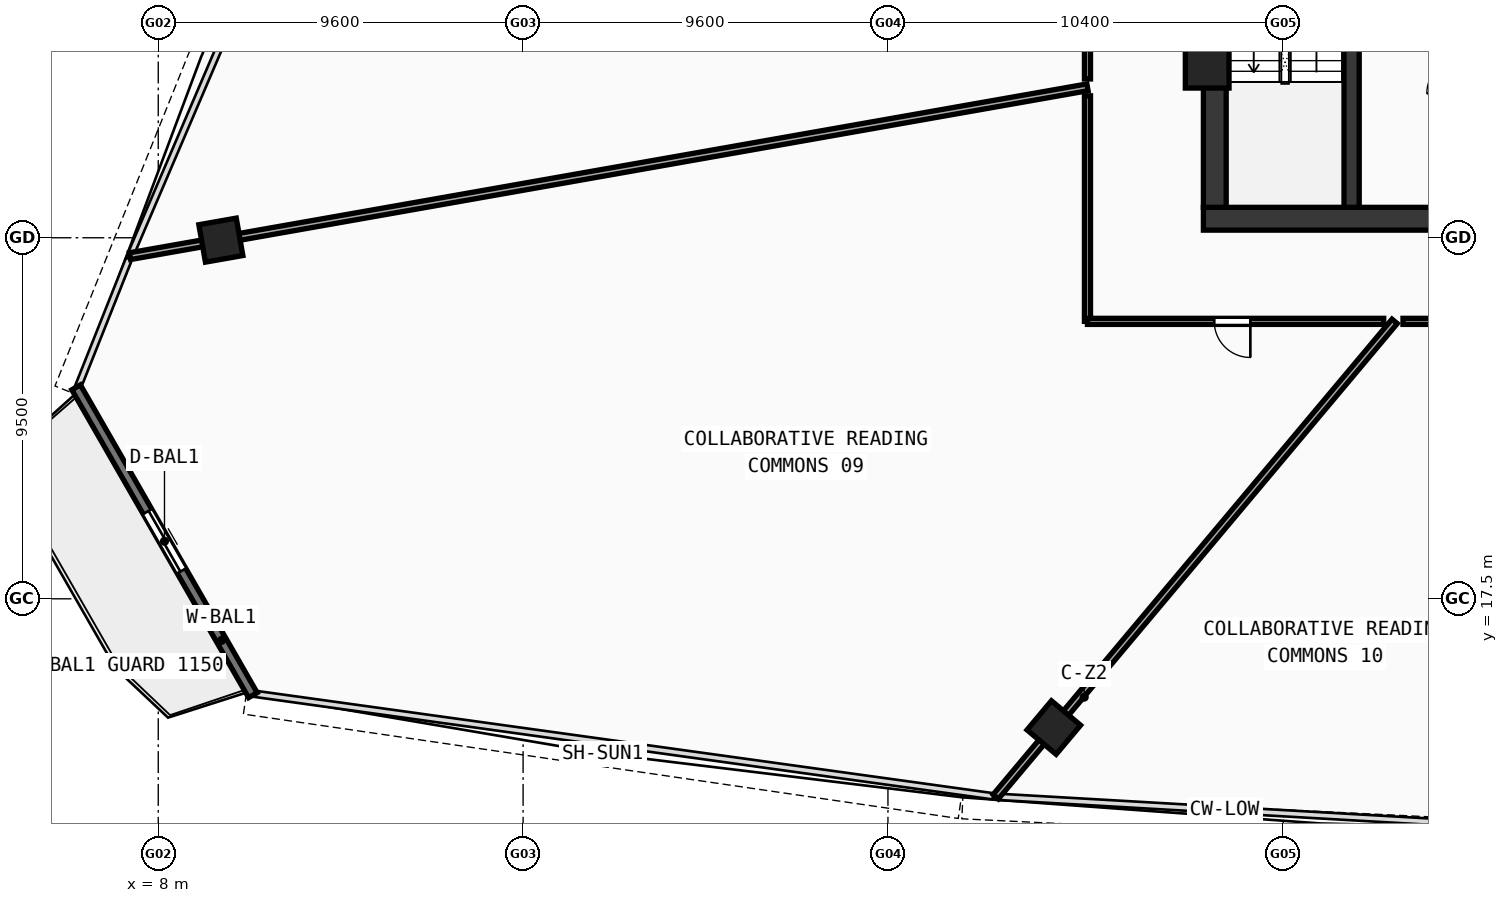
"""IFC4 building model, lengths in metres.
Left out: names, types, materials, properties, quantities, classifications, styles, units other than length and angle.
Written with IfcOpenShell. Run it as: python <this file> out.ifc"""

import sys

from ifc_helpers import new_model, si_unit, direction, frame, frame_2d, origin, origin_with_axes, origin_2d, place, context, subcontext, project, spatial, rectangle, hollow_rectangle, extrude, source, transform, mapped, element, fill, save


model = new_model("IFC4")
c1 = context("Model", 3, precision=1e-05, world=origin(), true_north=direction((0.0, 1.0)))
c2 = subcontext(c1, "Body", "Model", "MODEL_VIEW")
j1 = project(units=[si_unit("LENGTHUNIT", "METRE"), si_unit("PLANEANGLEUNIT", "RADIAN")], contexts=[c1])
p1 = place(None, origin())
s1 = spatial("IfcSite", under=j1, at=p1, CompositionType="ELEMENT")
p2 = place(p1, origin())
s2 = spatial("IfcBuilding", under=s1, at=p2, CompositionType="ELEMENT")
p3 = place(p2, frame((0.0, 0.0, 84.98)))
s3 = spatial("IfcBuildingStorey", under=s2, at=p3, CompositionType="ELEMENT", Elevation=84.98)
p4 = place(p3, frame((35.5, 27.5, 0.0), z_axis=(0.0, 0.0, 1.0), x_axis=(1.0, 0.0, 0.0)))
e1 = element("IfcWall", 1, at=p4, inside=s3, PredefinedType="SHEAR", context=c2, shape_type="SweptSolid", body=[
    extrude(rectangle(XDim=25.0, YDim=0.6, at=frame_2d((12.5, 0.0))), origin(), (0.0, 0.0, 1.0), 3.54),
])
p5 = place(p3, frame((35.8, 27.8, 0.0), z_axis=(0.0, 0.0, 1.0), x_axis=(0.0, 1.0, 0.0)))
e2 = element("IfcWall", 2, at=p5, inside=s3, PredefinedType="SHEAR", context=c2, shape_type="SweptSolid", body=[
    extrude(rectangle(XDim=12.1, YDim=0.6, at=frame_2d((6.05, 0.0))), origin(), (0.0, 0.0, 1.0), 3.54),
])
p6 = place(p3, frame((39.4, 27.8, 0.0), z_axis=(0.0, 0.0, 1.0), x_axis=(0.0, 1.0, 0.0)))
e3 = element("IfcWall", 3, at=p6, inside=s3, PredefinedType="SHEAR", context=c2, shape_type="SweptSolid", body=[
    extrude(rectangle(XDim=12.1, YDim=0.4, at=frame_2d((6.05, 0.0))), origin(), (0.0, 0.0, 1.0), 3.54),
])
p7 = place(p6, frame((9.95, 0.0, 0.0)))
e4 = element("IfcOpeningElement", 4, at=p7, cuts=e3, PredefinedType="OPENING", context=c2, shape_type="SweptSolid", body=[
    extrude(rectangle(XDim=1.1, YDim=2.1, at=frame_2d((0.55, 1.05))), frame((0.0, 0.21, 0.0), z_axis=(0.0, -1.0, 0.0), x_axis=(1.0, 0.0, 0.0)), (0.0, 0.0, 1.0), 0.42),
])
m1 = source(origin(), c2, "Body", "SweptSolid", [
    extrude(hollow_rectangle(XDim=1.15, YDim=1.15, WallThickness=0.048, at=origin_2d()), origin(), (0.0, 0.0, 1.0), 3.8),
])
p8 = place(p3, frame((35.6, 31.513, -0.26), z_axis=(0.0, 0.0, 1.0), x_axis=(1.0, 0.0, 0.0)))
e5 = element("IfcColumn", 5, at=p8, inside=s3, PredefinedType="COLUMN", context=c2, shape_type="MappedRepresentation", body=[
    mapped(m1, transform((0.0, 0.0, 0.0), scale=1.0)),
])
m2 = source(origin(), c2, "Body", "SweptSolid", [
    extrude(hollow_rectangle(XDim=1.0, YDim=1.0, WallThickness=0.042, at=origin_2d()), origin(), (0.0, 0.0, 1.0), 3.8),
])
for number, where, z_axis, x_axis in (
    (6, (31.564, 14.112, -0.26), (0.0, 0.0, 1.0), (0.766, -0.643, 0.0)),
    (7, (9.647, 26.938, -0.26), (0.0, 0.0, 1.0), (0.174, -0.985, 0.0)),
):
    element("IfcColumn", number, at=place(p3, frame(where, z_axis=z_axis, x_axis=x_axis)), inside=s3, PredefinedType="COLUMN", context=c2, shape_type="MappedRepresentation", body=[
        mapped(m2, transform((0.0, 0.0, 0.0), scale=1.0)),
    ])
p9 = place(p3, frame((5.838, 23.065, 0.0), z_axis=(0.0, 0.0, 1.0), x_axis=(0.497922114025, -0.867221752705, 0.0)))
e8 = element("IfcWall", 8, at=p9, inside=s3, PredefinedType="STANDARD", context=c2, shape_type="SweptSolid", body=[
    extrude(rectangle(XDim=9.343, YDim=0.26, at=frame_2d((4.671, 0.0))), origin(), (0.0, 0.0, 1.0), 3.54),
])
p10 = place(p9, frame((3.771, 0.0, 0.0)))
e9 = element("IfcOpeningElement", 9, at=p10, cuts=e8, PredefinedType="OPENING", context=c2, shape_type="SweptSolid", body=[
    extrude(rectangle(XDim=1.8, YDim=2.15, at=frame_2d((0.9, 1.075))), frame((0.0, 0.14, 0.0), z_axis=(0.0, -1.0, 0.0), x_axis=(1.0, 0.0, 0.0)), (0.0, 0.0, 1.0), 0.28),
])
p11 = place(p3, frame((32.45, 30.958, 0.0), z_axis=(0.0, 0.0, 1.0), x_axis=(-0.984808048641, -0.173646501066, 0.0)))
e10 = element("IfcWall", 10, at=p11, inside=s3, PredefinedType="PARTITIONING", context=c2, shape_type="SweptSolid", body=[
    extrude(rectangle(XDim=25.582, YDim=0.18, at=frame_2d((12.791, 0.0))), origin(), (0.0, 0.0, 1.0), 2.84),
])
p12 = place(p3, frame((40.532, 24.8, 0.0), z_axis=(0.0, 0.0, 1.0), x_axis=(-0.642790086939, -0.76604236445, 0.0)))
e11 = element("IfcWall", 11, at=p12, inside=s3, PredefinedType="PARTITIONING", context=c2, shape_type="SweptSolid", body=[
    extrude(rectangle(XDim=16.326, YDim=0.18, at=frame_2d((8.163, 0.0))), origin(), (0.0, 0.0, 1.0), 2.84),
])
p13 = place(p3, frame((32.45, 24.8, 0.0), z_axis=(0.0, 0.0, 1.0), x_axis=(0.0, 1.0, 0.0)))
e12 = element("IfcWall", 12, at=p13, inside=s3, PredefinedType="PARTITIONING", context=c2, shape_type="SweptSolid", body=[
    extrude(rectangle(XDim=5.935, YDim=0.16, at=frame_2d((2.967, 0.0))), origin(), (0.0, 0.0, 1.0), 3.14),
])
p14 = place(p3, frame((32.45, 31.178, 0.0), z_axis=(0.0, 0.0, 1.0), x_axis=(0.0, 1.0, 0.0)))
e13 = element("IfcWall", 13, at=p14, inside=s3, PredefinedType="PARTITIONING", context=c2, shape_type="SweptSolid", body=[
    extrude(rectangle(XDim=16.304, YDim=0.16, at=frame_2d((8.152, 0.0))), origin(), (0.0, 0.0, 1.0), 2.84),
])
p15 = place(p14, frame((7.677, 0.0, 0.0)))
e14 = element("IfcOpeningElement", 14, at=p15, cuts=e13, PredefinedType="OPENING", context=c2, shape_type="SweptSolid", body=[
    extrude(rectangle(XDim=0.95, YDim=2.1, at=frame_2d((0.475, 1.05))), frame((0.0, 0.09, 0.0), z_axis=(0.0, -1.0, 0.0), x_axis=(1.0, 0.0, 0.0)), (0.0, 0.0, 1.0), 0.18),
])
p16 = place(p3, frame((45.387, 24.8, 0.0), z_axis=(0.0, 0.0, 1.0), x_axis=(-1.0, 0.0, 0.0)))
e15 = element("IfcWall", 15, at=p16, inside=s3, PredefinedType="PARTITIONING", context=c2, shape_type="SweptSolid", body=[
    extrude(rectangle(XDim=4.635, YDim=0.16, at=frame_2d((2.318, 0.0))), origin(), (0.0, 0.0, 1.0), 2.84),
])
p17 = place(p16, frame((1.839, 0.0, 0.0)))
e16 = element("IfcOpeningElement", 16, at=p17, cuts=e15, PredefinedType="OPENING", context=c2, shape_type="SweptSolid", body=[
    extrude(rectangle(XDim=0.95, YDim=2.1, at=frame_2d((0.475, 1.05))), frame((0.0, 0.09, 0.0), z_axis=(0.0, -1.0, 0.0), x_axis=(1.0, 0.0, 0.0)), (0.0, 0.0, 1.0), 0.18),
])
p18 = place(p3, frame((40.245, 24.8, 0.0), z_axis=(0.0, 0.0, 1.0), x_axis=(-1.0, 0.0, 0.0)))
e17 = element("IfcWall", 17, at=p18, inside=s3, PredefinedType="PARTITIONING", context=c2, shape_type="SweptSolid", body=[
    extrude(rectangle(XDim=7.795, YDim=0.16, at=frame_2d((3.897, 0.0))), origin(), (0.0, 0.0, 1.0), 3.14),
])
p19 = place(p18, frame((3.509, 0.0, 0.0)))
e18 = element("IfcOpeningElement", 18, at=p19, cuts=e17, PredefinedType="OPENING", context=c2, shape_type="SweptSolid", body=[
    extrude(rectangle(XDim=0.95, YDim=2.1, at=frame_2d((0.475, 1.05))), frame((0.0, 0.09, 0.0), z_axis=(0.0, -1.0, 0.0), x_axis=(1.0, 0.0, 0.0)), (0.0, 0.0, 1.0), 0.18),
])
m3 = source(origin(), c2, "Body", "SweptSolid", [
    extrude(rectangle(XDim=1.8, YDim=2.15, at=frame_2d((0.9, 1.075))), frame((0.0, 0.025, 0.0), z_axis=(0.0, -1.0, 0.0), x_axis=(1.0, 0.0, 0.0)), (0.0, 0.0, 1.0), 0.05),
])
p20 = place(p10, origin_with_axes())
e19 = element("IfcDoor", 19, at=p20, inside=s3, OperationType="DOUBLE_DOOR_SLIDING", PredefinedType="DOOR", context=c2, shape_type="MappedRepresentation", body=[
    mapped(m3, transform((0.0, 0.0, 0.0), scale=1.0)),
])
fill(e9, e19)
m4 = source(origin(), c2, "Body", "SweptSolid", [
    extrude(rectangle(XDim=0.95, YDim=2.1, at=frame_2d((0.475, 1.05))), frame((0.0, 0.025, 0.0), z_axis=(0.0, -1.0, 0.0), x_axis=(1.0, 0.0, 0.0)), (0.0, 0.0, 1.0), 0.05),
])
p21 = place(p19, origin_with_axes())
e20 = element("IfcDoor", 20, at=p21, inside=s3, OperationType="SINGLE_SWING_LEFT", PredefinedType="DOOR", context=c2, shape_type="MappedRepresentation", body=[
    mapped(m4, transform((0.0, 0.0, 0.0), scale=1.0)),
])
fill(e18, e20)
save(model, sys.argv[1])
